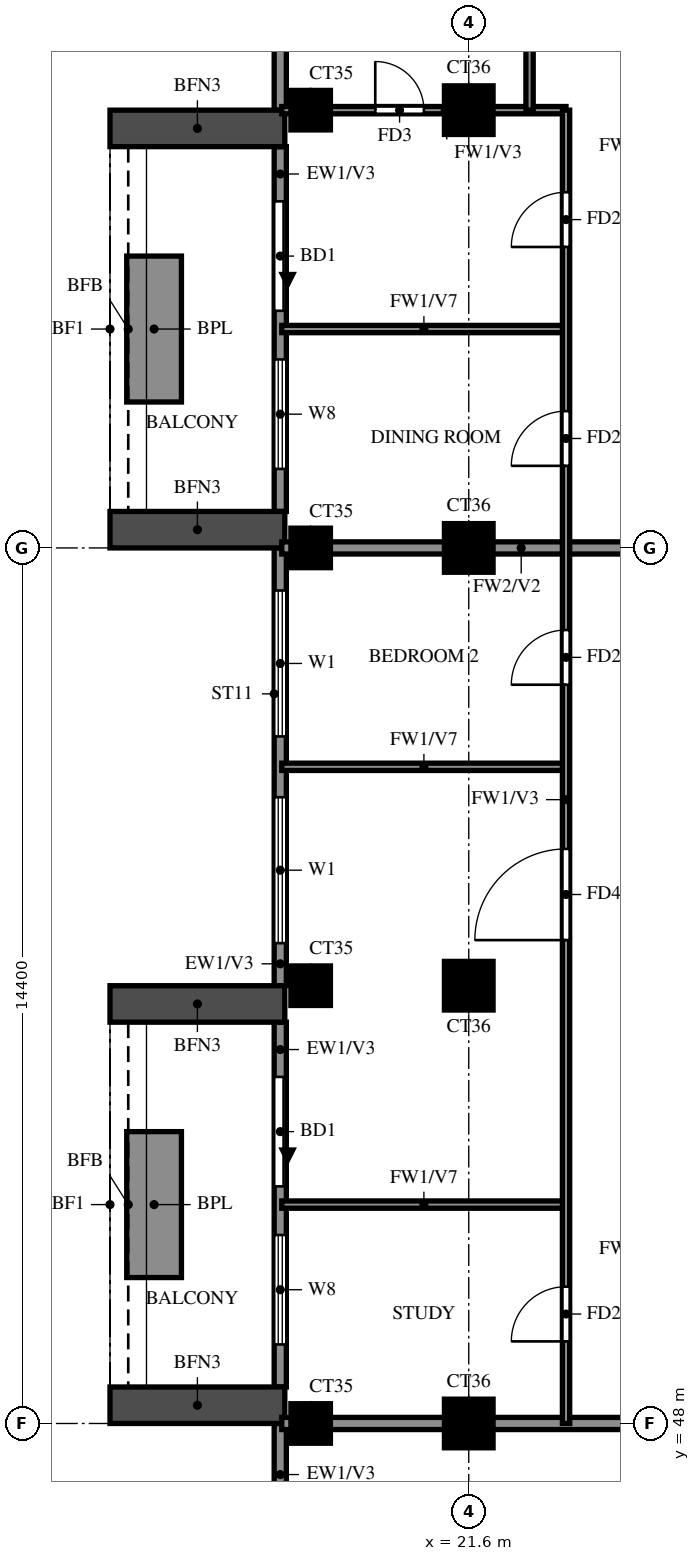
"""IFC4 building model, lengths in metres.
Left out: names, types, materials, properties, quantities, classifications, styles, units other than length and angle.
Written with IfcOpenShell. Run it as: python <this file> out.ifc"""

import sys

from ifc_helpers import new_model, si_unit, direction, frame, frame_2d, origin, origin_2d, place, context, subcontext, project, spatial, rectangle, extrude, source, transform, mapped, element, fill, save


model = new_model("IFC4")
c1 = context("Model", 3, precision=1e-05, world=origin(), true_north=direction((0.0, 1.0)))
c2 = subcontext(c1, "Body", "Model", "MODEL_VIEW")
j1 = project(units=[si_unit("LENGTHUNIT", "METRE"), si_unit("PLANEANGLEUNIT", "RADIAN")], contexts=[c1])
p1 = place(None, origin())
s1 = spatial("IfcSite", under=j1, at=p1, CompositionType="ELEMENT")
p2 = place(p1, origin())
s2 = spatial("IfcBuilding", under=s1, at=p2, CompositionType="ELEMENT")
p3 = place(p2, frame((0.0, 0.0, 246.5)))
s3 = spatial("IfcBuildingStorey", under=s2, at=p3, CompositionType="ELEMENT", Elevation=246.5)
m1 = source(origin(), c2, "Body", "SweptSolid", [
    extrude(rectangle(XDim=0.65, YDim=0.65, at=origin_2d()), origin(), (0.0, 0.0, 1.0), 3.22),
])
p4 = place(p3, frame((19.0, 48.0, 0.0), z_axis=(0.0, 0.0, 1.0), x_axis=(1.0, 0.0, 0.0)))
e1 = element("IfcColumn", 1, at=p4, inside=s3, PredefinedType="COLUMN", context=c2, shape_type="MappedRepresentation", body=[
    mapped(m1, transform((0.0, 0.0, 0.0))),
])
m2 = source(origin(), c2, "Body", "SweptSolid", [
    extrude(rectangle(XDim=0.8, YDim=0.8, at=origin_2d()), origin(), (0.0, 0.0, 1.0), 3.22),
])
p5 = place(p3, frame((21.6, 48.0, 0.0), z_axis=(0.0, 0.0, 1.0), x_axis=(1.0, 0.0, 0.0)))
e2 = element("IfcColumn", 2, at=p5, inside=s3, PredefinedType="COLUMN", context=c2, shape_type="MappedRepresentation", body=[
    mapped(m2, transform((0.0, 0.0, 0.0))),
])
p6 = place(p3, frame((19.0, 55.2, 0.0), z_axis=(0.0, 0.0, 1.0), x_axis=(1.0, 0.0, 0.0)))
e3 = element("IfcColumn", 3, at=p6, inside=s3, PredefinedType="COLUMN", context=c2, shape_type="MappedRepresentation", body=[
    mapped(m1, transform((0.0, 0.0, 0.0))),
])
p7 = place(p3, frame((21.6, 55.2, 0.0), z_axis=(0.0, 0.0, 1.0), x_axis=(1.0, 0.0, 0.0)))
e4 = element("IfcColumn", 4, at=p7, inside=s3, PredefinedType="COLUMN", context=c2, shape_type="MappedRepresentation", body=[
    mapped(m2, transform((0.0, 0.0, 0.0))),
])
p8 = place(p3, frame((19.0, 62.4, 0.0), z_axis=(0.0, 0.0, 1.0), x_axis=(1.0, 0.0, 0.0)))
e5 = element("IfcColumn", 5, at=p8, inside=s3, PredefinedType="COLUMN", context=c2, shape_type="MappedRepresentation", body=[
    mapped(m1, transform((0.0, 0.0, 0.0))),
])
p9 = place(p3, frame((21.6, 62.4, 0.0), z_axis=(0.0, 0.0, 1.0), x_axis=(1.0, 0.0, 0.0)))
e6 = element("IfcColumn", 6, at=p9, inside=s3, PredefinedType="COLUMN", context=c2, shape_type="MappedRepresentation", body=[
    mapped(m2, transform((0.0, 0.0, 0.0))),
])
p10 = place(p3, frame((19.0, 69.6, 0.0), z_axis=(0.0, 0.0, 1.0), x_axis=(1.0, 0.0, 0.0)))
e7 = element("IfcColumn", 7, at=p10, inside=s3, PredefinedType="COLUMN", context=c2, shape_type="MappedRepresentation", body=[
    mapped(m1, transform((0.0, 0.0, 0.0))),
])
p11 = place(p3, frame((21.6, 69.6, 0.0), z_axis=(0.0, 0.0, 1.0), x_axis=(1.0, 0.0, 0.0)))
e8 = element("IfcColumn", 8, at=p11, inside=s3, PredefinedType="COLUMN", context=c2, shape_type="MappedRepresentation", body=[
    mapped(m2, transform((0.0, 0.0, 0.0))),
])
p12 = place(p3, frame((18.5, 76.6, 0.0), z_axis=(0.0, 0.0, 1.0), x_axis=(0.0, -1.0, 0.0)))
e9 = element("IfcWall", 9, at=p12, inside=s3, PredefinedType="SOLIDWALL", context=c2, shape_type="SweptSolid", body=[
    extrude(rectangle(XDim=7.0, YDim=0.2, at=frame_2d((3.5, 0.0))), origin(), (0.0, 0.0, 1.0), 3.22),
])
p13 = place(p12, frame((4.65, 0.0, 1.5)))
e10 = element("IfcOpeningElement", 10, at=p13, cuts=e9, PredefinedType="OPENING", context=c2, shape_type="SweptSolid", body=[
    extrude(rectangle(XDim=0.9, YDim=0.9, at=frame_2d((0.45, 0.45))), frame((0.0, 0.11, 0.0), z_axis=(0.0, -1.0, 0.0), x_axis=(1.0, 0.0, 0.0)), (0.0, 0.0, 1.0), 0.22),
])
p14 = place(p12, frame((0.6, 0.0, 0.6)))
e11 = element("IfcOpeningElement", 11, at=p14, cuts=e9, PredefinedType="OPENING", context=c2, shape_type="SweptSolid", body=[
    extrude(rectangle(XDim=2.4, YDim=2.4, at=frame_2d((1.2, 1.2))), frame((0.0, 0.11, 0.0), z_axis=(0.0, -1.0, 0.0), x_axis=(1.0, 0.0, 0.0)), (0.0, 0.0, 1.0), 0.22),
])
p15 = place(p3, frame((18.5, 69.0, 0.0), z_axis=(0.0, 0.0, 1.0), x_axis=(0.0, -1.0, 0.0)))
e12 = element("IfcWall", 12, at=p15, inside=s3, PredefinedType="SOLIDWALL", context=c2, shape_type="SweptSolid", body=[
    extrude(rectangle(XDim=6.0, YDim=0.2, at=frame_2d((3.0, 0.0))), origin(), (0.0, 0.0, 1.0), 3.22),
])
p16 = place(p15, frame((0.9, 0.0, 0.0)))
e13 = element("IfcOpeningElement", 13, at=p16, cuts=e12, PredefinedType="OPENING", context=c2, shape_type="SweptSolid", body=[
    extrude(rectangle(XDim=1.8, YDim=2.4, at=frame_2d((0.9, 1.2))), frame((0.0, 0.11, 0.0), z_axis=(0.0, -1.0, 0.0), x_axis=(1.0, 0.0, 0.0)), (0.0, 0.0, 1.0), 0.22),
])
p17 = place(p15, frame((3.5, 0.0, 0.6)))
e14 = element("IfcOpeningElement", 14, at=p17, cuts=e12, PredefinedType="OPENING", context=c2, shape_type="SweptSolid", body=[
    extrude(rectangle(XDim=1.8, YDim=2.4, at=frame_2d((0.9, 1.2))), frame((0.0, 0.11, 0.0), z_axis=(0.0, -1.0, 0.0), x_axis=(1.0, 0.0, 0.0)), (0.0, 0.0, 1.0), 0.22),
])
p18 = place(p3, frame((18.5, 62.4, 0.0), z_axis=(0.0, 0.0, 1.0), x_axis=(0.0, -1.0, 0.0)))
e15 = element("IfcWall", 15, at=p18, inside=s3, PredefinedType="SOLIDWALL", context=c2, shape_type="SweptSolid", body=[
    extrude(rectangle(XDim=7.2, YDim=0.2, at=frame_2d((3.6, 0.0))), origin(), (0.0, 0.0, 1.0), 3.22),
])
p19 = place(p18, frame((4.1, 0.0, 0.6)))
e16 = element("IfcOpeningElement", 16, at=p19, cuts=e15, PredefinedType="OPENING", context=c2, shape_type="SweptSolid", body=[
    extrude(rectangle(XDim=2.4, YDim=2.4, at=frame_2d((1.2, 1.2))), frame((0.0, 0.11, 0.0), z_axis=(0.0, -1.0, 0.0), x_axis=(1.0, 0.0, 0.0)), (0.0, 0.0, 1.0), 0.22),
])
p20 = place(p18, frame((0.7, 0.0, 0.6)))
e17 = element("IfcOpeningElement", 17, at=p20, cuts=e15, PredefinedType="OPENING", context=c2, shape_type="SweptSolid", body=[
    extrude(rectangle(XDim=2.4, YDim=2.4, at=frame_2d((1.2, 1.2))), frame((0.0, 0.11, 0.0), z_axis=(0.0, -1.0, 0.0), x_axis=(1.0, 0.0, 0.0)), (0.0, 0.0, 1.0), 0.22),
])
p21 = place(p3, frame((18.5, 54.6, 0.0), z_axis=(0.0, 0.0, 1.0), x_axis=(0.0, -1.0, 0.0)))
e18 = element("IfcWall", 18, at=p21, inside=s3, PredefinedType="SOLIDWALL", context=c2, shape_type="SweptSolid", body=[
    extrude(rectangle(XDim=6.0, YDim=0.2, at=frame_2d((3.0, 0.0))), origin(), (0.0, 0.0, 1.0), 3.22),
])
p22 = place(p21, frame((0.9, 0.0, 0.0)))
e19 = element("IfcOpeningElement", 19, at=p22, cuts=e18, PredefinedType="OPENING", context=c2, shape_type="SweptSolid", body=[
    extrude(rectangle(XDim=1.8, YDim=2.4, at=frame_2d((0.9, 1.2))), frame((0.0, 0.11, 0.0), z_axis=(0.0, -1.0, 0.0), x_axis=(1.0, 0.0, 0.0)), (0.0, 0.0, 1.0), 0.22),
])
p23 = place(p21, frame((3.5, 0.0, 0.6)))
e20 = element("IfcOpeningElement", 20, at=p23, cuts=e18, PredefinedType="OPENING", context=c2, shape_type="SweptSolid", body=[
    extrude(rectangle(XDim=1.8, YDim=2.4, at=frame_2d((0.9, 1.2))), frame((0.0, 0.11, 0.0), z_axis=(0.0, -1.0, 0.0), x_axis=(1.0, 0.0, 0.0)), (0.0, 0.0, 1.0), 0.22),
])
p24 = place(p3, frame((18.5, 48.0, 0.0), z_axis=(0.0, 0.0, 1.0), x_axis=(0.0, -1.0, 0.0)))
e21 = element("IfcWall", 21, at=p24, inside=s3, PredefinedType="SOLIDWALL", context=c2, shape_type="SweptSolid", body=[
    extrude(rectangle(XDim=4.8, YDim=0.2, at=frame_2d((2.4, 0.0))), origin(), (0.0, 0.0, 1.0), 3.22),
])
p25 = place(p24, frame((1.2, 0.0, 0.6)))
e22 = element("IfcOpeningElement", 22, at=p25, cuts=e21, PredefinedType="OPENING", context=c2, shape_type="SweptSolid", body=[
    extrude(rectangle(XDim=2.4, YDim=2.4, at=frame_2d((1.2, 1.2))), frame((0.0, 0.11, 0.0), z_axis=(0.0, -1.0, 0.0), x_axis=(1.0, 0.0, 0.0)), (0.0, 0.0, 1.0), 0.22),
])
for number, where, z_axis, x_axis in (
    (23, (18.575, 69.3, 0.0), (0.0, 0.0, 1.0), (-1.0, 0.0, 0.0)),
    (24, (18.575, 62.7, 0.0), (0.0, 0.0, 1.0), (-1.0, 0.0, 0.0)),
):
    element("IfcWall", number, at=place(p3, frame(where, z_axis=z_axis, x_axis=x_axis)), inside=s3, PredefinedType="SOLIDWALL", context=c2, shape_type="SweptSolid", body=[
        extrude(rectangle(XDim=2.875, YDim=0.6, at=frame_2d((1.438, 0.0))), origin(), (0.0, 0.0, 1.0), 2.85),
    ])
p26 = place(p3, frame((16.425, 67.2, 0.0), z_axis=(0.0, 0.0, 1.0), x_axis=(0.0, -1.0, 0.0)))
e25 = element("IfcWall", 25, at=p26, inside=s3, PredefinedType="SOLIDWALL", context=c2, shape_type="SweptSolid", body=[
    extrude(rectangle(XDim=2.4, YDim=0.9, at=frame_2d((1.2, 0.0))), origin(), (0.0, 0.0, 1.0), 0.9),
])
for number, where, z_axis, x_axis in (
    (26, (18.575, 54.9, 0.0), (0.0, 0.0, 1.0), (-1.0, 0.0, 0.0)),
    (27, (18.575, 48.3, 0.0), (0.0, 0.0, 1.0), (-1.0, 0.0, 0.0)),
):
    element("IfcWall", number, at=place(p3, frame(where, z_axis=z_axis, x_axis=x_axis)), inside=s3, PredefinedType="SOLIDWALL", context=c2, shape_type="SweptSolid", body=[
        extrude(rectangle(XDim=2.875, YDim=0.6, at=frame_2d((1.438, 0.0))), origin(), (0.0, 0.0, 1.0), 2.85),
    ])
p27 = place(p3, frame((16.425, 52.8, 0.0), z_axis=(0.0, 0.0, 1.0), x_axis=(0.0, -1.0, 0.0)))
e28 = element("IfcWall", 28, at=p27, inside=s3, PredefinedType="SOLIDWALL", context=c2, shape_type="SweptSolid", body=[
    extrude(rectangle(XDim=2.4, YDim=0.9, at=frame_2d((1.2, 0.0))), origin(), (0.0, 0.0, 1.0), 0.9),
])
p28 = place(p3, frame((18.525, 48.0, 0.0), z_axis=(0.0, 0.0, 1.0), x_axis=(1.0, 0.0, 0.0)))
e29 = element("IfcWall", 29, at=p28, inside=s3, PredefinedType="SOLIDWALL", context=c2, shape_type="SweptSolid", body=[
    extrude(rectangle(XDim=15.075, YDim=0.2, at=frame_2d((7.538, 0.0))), origin(), (0.0, 0.0, 1.0), 3.22),
])
p29 = place(p3, frame((18.525, 62.4, 0.0), z_axis=(0.0, 0.0, 1.0), x_axis=(1.0, 0.0, 0.0)))
e30 = element("IfcWall", 30, at=p29, inside=s3, PredefinedType="SOLIDWALL", context=c2, shape_type="SweptSolid", body=[
    extrude(rectangle(XDim=7.875, YDim=0.2, at=frame_2d((3.938, 0.0))), origin(), (0.0, 0.0, 1.0), 3.22),
])
for number, where, z_axis, x_axis in (
    (31, (18.525, 51.6, 0.0), (0.0, 0.0, 1.0), (1.0, 0.0, 0.0)),
    (32, (18.525, 58.8, 0.0), (0.0, 0.0, 1.0), (1.0, 0.0, 0.0)),
    (33, (18.525, 66.0, 0.0), (0.0, 0.0, 1.0), (1.0, 0.0, 0.0)),
):
    element("IfcWall", number, at=place(p3, frame(where, z_axis=z_axis, x_axis=x_axis)), inside=s3, PredefinedType="PARTITIONING", context=c2, shape_type="SweptSolid", body=[
        extrude(rectangle(XDim=4.675, YDim=0.12, at=frame_2d((2.337, 0.0))), origin(), (0.0, 0.0, 1.0), 2.32),
    ])
p30 = place(p3, frame((18.525, 69.6, 0.0), z_axis=(0.0, 0.0, 1.0), x_axis=(1.0, 0.0, 0.0)))
e34 = element("IfcWall", 34, at=p30, inside=s3, PredefinedType="PARTITIONING", context=c2, shape_type="SweptSolid", body=[
    extrude(rectangle(XDim=4.675, YDim=0.12, at=frame_2d((2.337, 0.0))), origin(), (0.0, 0.0, 1.0), 3.22),
])
p31 = place(p30, frame((1.538, 0.0, 0.0)))
e35 = element("IfcOpeningElement", 35, at=p31, cuts=e34, PredefinedType="OPENING", context=c2, shape_type="SweptSolid", body=[
    extrude(rectangle(XDim=0.8, YDim=2.1, at=frame_2d((0.4, 1.05))), frame((0.0, 0.07, 0.0), z_axis=(0.0, -1.0, 0.0), x_axis=(1.0, 0.0, 0.0)), (0.0, 0.0, 1.0), 0.14),
])
p32 = place(p3, frame((22.6, 69.6, 0.0), z_axis=(0.0, 0.0, 1.0), x_axis=(0.0, 1.0, 0.0)))
e36 = element("IfcWall", 36, at=p32, inside=s3, PredefinedType="PARTITIONING", context=c2, shape_type="SweptSolid", body=[
    extrude(rectangle(XDim=3.6, YDim=0.12, at=frame_2d((1.8, 0.0))), origin(), (0.0, 0.0, 1.0), 3.22),
])
p33 = place(p3, frame((23.2, 48.0, 0.0), z_axis=(0.0, 0.0, 1.0), x_axis=(0.0, 1.0, 0.0)))
e37 = element("IfcWall", 37, at=p33, inside=s3, PredefinedType="PARTITIONING", context=c2, shape_type="SweptSolid", body=[
    extrude(rectangle(XDim=21.6, YDim=0.12, at=frame_2d((10.8, 0.0))), origin(), (0.0, 0.0, 1.0), 3.22),
])
p34 = place(p33, frame((1.35, 0.0, 0.0)))
e38 = element("IfcOpeningElement", 38, at=p34, cuts=e37, PredefinedType="OPENING", context=c2, shape_type="SweptSolid", body=[
    extrude(rectangle(XDim=0.9, YDim=2.1, at=frame_2d((0.45, 1.05))), frame((0.0, 0.07, 0.0), z_axis=(0.0, -1.0, 0.0), x_axis=(1.0, 0.0, 0.0)), (0.0, 0.0, 1.0), 0.14),
])
p35 = place(p33, frame((7.95, 0.0, 0.0)))
e39 = element("IfcOpeningElement", 39, at=p35, cuts=e37, PredefinedType="OPENING", context=c2, shape_type="SweptSolid", body=[
    extrude(rectangle(XDim=1.5, YDim=2.1, at=frame_2d((0.75, 1.05))), frame((0.0, 0.07, 0.0), z_axis=(0.0, -1.0, 0.0), x_axis=(1.0, 0.0, 0.0)), (0.0, 0.0, 1.0), 0.14),
])
p36 = place(p33, frame((12.15, 0.0, 0.0)))
e40 = element("IfcOpeningElement", 40, at=p36, cuts=e37, PredefinedType="OPENING", context=c2, shape_type="SweptSolid", body=[
    extrude(rectangle(XDim=0.9, YDim=2.1, at=frame_2d((0.45, 1.05))), frame((0.0, 0.07, 0.0), z_axis=(0.0, -1.0, 0.0), x_axis=(1.0, 0.0, 0.0)), (0.0, 0.0, 1.0), 0.14),
])
p37 = place(p33, frame((15.75, 0.0, 0.0)))
e41 = element("IfcOpeningElement", 41, at=p37, cuts=e37, PredefinedType="OPENING", context=c2, shape_type="SweptSolid", body=[
    extrude(rectangle(XDim=0.9, YDim=2.1, at=frame_2d((0.45, 1.05))), frame((0.0, 0.07, 0.0), z_axis=(0.0, -1.0, 0.0), x_axis=(1.0, 0.0, 0.0)), (0.0, 0.0, 1.0), 0.14),
])
p38 = place(p33, frame((19.35, 0.0, 0.0)))
e42 = element("IfcOpeningElement", 42, at=p38, cuts=e37, PredefinedType="OPENING", context=c2, shape_type="SweptSolid", body=[
    extrude(rectangle(XDim=0.9, YDim=2.1, at=frame_2d((0.45, 1.05))), frame((0.0, 0.07, 0.0), z_axis=(0.0, -1.0, 0.0), x_axis=(1.0, 0.0, 0.0)), (0.0, 0.0, 1.0), 0.14),
])
p39 = place(p16, origin())
e43 = element("IfcDoor", 43, at=p39, inside=s3, OperationType="DOUBLE_DOOR_SLIDING", PredefinedType="DOOR", context=c2, shape_type="SweptSolid", body=[
    extrude(rectangle(XDim=1.8, YDim=2.4, at=frame_2d((0.9, 1.2))), frame((0.0, 0.025, 0.0), z_axis=(0.0, -1.0, 0.0), x_axis=(1.0, 0.0, 0.0)), (0.0, 0.0, 1.0), 0.05),
])
fill(e13, e43)
p40 = place(p17, origin())
e44 = element("IfcWindow", 44, at=p40, inside=s3, PartitioningType="DOUBLE_PANEL_VERTICAL", PredefinedType="WINDOW", context=c2, shape_type="SweptSolid", body=[
    extrude(rectangle(XDim=1.8, YDim=2.4, at=frame_2d((0.9, 1.2))), frame((0.0, 0.03, 0.0), z_axis=(0.0, -1.0, 0.0), x_axis=(1.0, 0.0, 0.0)), (0.0, 0.0, 1.0), 0.06),
])
fill(e14, e44)
p41 = place(p19, origin())
e45 = element("IfcWindow", 45, at=p41, inside=s3, PartitioningType="DOUBLE_PANEL_VERTICAL", PredefinedType="WINDOW", context=c2, shape_type="SweptSolid", body=[
    extrude(rectangle(XDim=2.4, YDim=2.4, at=frame_2d((1.2, 1.2))), frame((0.0, 0.03, 0.0), z_axis=(0.0, -1.0, 0.0), x_axis=(1.0, 0.0, 0.0)), (0.0, 0.0, 1.0), 0.06),
])
fill(e16, e45)
p42 = place(p20, origin())
e46 = element("IfcWindow", 46, at=p42, inside=s3, PartitioningType="DOUBLE_PANEL_VERTICAL", PredefinedType="WINDOW", context=c2, shape_type="SweptSolid", body=[
    extrude(rectangle(XDim=2.4, YDim=2.4, at=frame_2d((1.2, 1.2))), frame((0.0, 0.03, 0.0), z_axis=(0.0, -1.0, 0.0), x_axis=(1.0, 0.0, 0.0)), (0.0, 0.0, 1.0), 0.06),
])
fill(e17, e46)
p43 = place(p22, origin())
e47 = element("IfcDoor", 47, at=p43, inside=s3, OperationType="DOUBLE_DOOR_SLIDING", PredefinedType="DOOR", context=c2, shape_type="SweptSolid", body=[
    extrude(rectangle(XDim=1.8, YDim=2.4, at=frame_2d((0.9, 1.2))), frame((0.0, 0.025, 0.0), z_axis=(0.0, -1.0, 0.0), x_axis=(1.0, 0.0, 0.0)), (0.0, 0.0, 1.0), 0.05),
])
fill(e19, e47)
p44 = place(p23, origin())
e48 = element("IfcWindow", 48, at=p44, inside=s3, PartitioningType="DOUBLE_PANEL_VERTICAL", PredefinedType="WINDOW", context=c2, shape_type="SweptSolid", body=[
    extrude(rectangle(XDim=1.8, YDim=2.4, at=frame_2d((0.9, 1.2))), frame((0.0, 0.03, 0.0), z_axis=(0.0, -1.0, 0.0), x_axis=(1.0, 0.0, 0.0)), (0.0, 0.0, 1.0), 0.06),
])
fill(e20, e48)
p45 = place(p34, origin())
e49 = element("IfcDoor", 49, at=p45, inside=s3, OperationType="SINGLE_SWING_LEFT", PredefinedType="DOOR", context=c2, shape_type="SweptSolid", body=[
    extrude(rectangle(XDim=0.9, YDim=2.1, at=frame_2d((0.45, 1.05))), frame((0.0, 0.025, 0.0), z_axis=(0.0, -1.0, 0.0), x_axis=(1.0, 0.0, 0.0)), (0.0, 0.0, 1.0), 0.05),
])
fill(e38, e49)
p46 = place(p35, origin())
e50 = element("IfcDoor", 50, at=p46, inside=s3, OperationType="SINGLE_SWING_LEFT", PredefinedType="DOOR", context=c2, shape_type="SweptSolid", body=[
    extrude(rectangle(XDim=1.5, YDim=2.1, at=frame_2d((0.75, 1.05))), frame((0.0, 0.025, 0.0), z_axis=(0.0, -1.0, 0.0), x_axis=(1.0, 0.0, 0.0)), (0.0, 0.0, 1.0), 0.05),
])
fill(e39, e50)
p47 = place(p36, origin())
e51 = element("IfcDoor", 51, at=p47, inside=s3, OperationType="SINGLE_SWING_LEFT", PredefinedType="DOOR", context=c2, shape_type="SweptSolid", body=[
    extrude(rectangle(XDim=0.9, YDim=2.1, at=frame_2d((0.45, 1.05))), frame((0.0, 0.025, 0.0), z_axis=(0.0, -1.0, 0.0), x_axis=(1.0, 0.0, 0.0)), (0.0, 0.0, 1.0), 0.05),
])
fill(e40, e51)
p48 = place(p37, origin())
e52 = element("IfcDoor", 52, at=p48, inside=s3, OperationType="SINGLE_SWING_RIGHT", PredefinedType="DOOR", context=c2, shape_type="SweptSolid", body=[
    extrude(rectangle(XDim=0.9, YDim=2.1, at=frame_2d((0.45, 1.05))), frame((0.0, 0.025, 0.0), z_axis=(0.0, -1.0, 0.0), x_axis=(1.0, 0.0, 0.0)), (0.0, 0.0, 1.0), 0.05),
])
fill(e41, e52)
p49 = place(p38, origin())
e53 = element("IfcDoor", 53, at=p49, inside=s3, OperationType="SINGLE_SWING_LEFT", PredefinedType="DOOR", context=c2, shape_type="SweptSolid", body=[
    extrude(rectangle(XDim=0.9, YDim=2.1, at=frame_2d((0.45, 1.05))), frame((0.0, 0.025, 0.0), z_axis=(0.0, -1.0, 0.0), x_axis=(1.0, 0.0, 0.0)), (0.0, 0.0, 1.0), 0.05),
])
fill(e42, e53)
p50 = place(p31, origin())
e54 = element("IfcDoor", 54, at=p50, inside=s3, OperationType="SINGLE_SWING_RIGHT", PredefinedType="DOOR", context=c2, shape_type="SweptSolid", body=[
    extrude(rectangle(XDim=0.8, YDim=2.1, at=frame_2d((0.4, 1.05))), frame((0.0, 0.025, 0.0), z_axis=(0.0, -1.0, 0.0), x_axis=(1.0, 0.0, 0.0)), (0.0, 0.0, 1.0), 0.05),
])
fill(e35, e54)
save(model, sys.argv[1])
